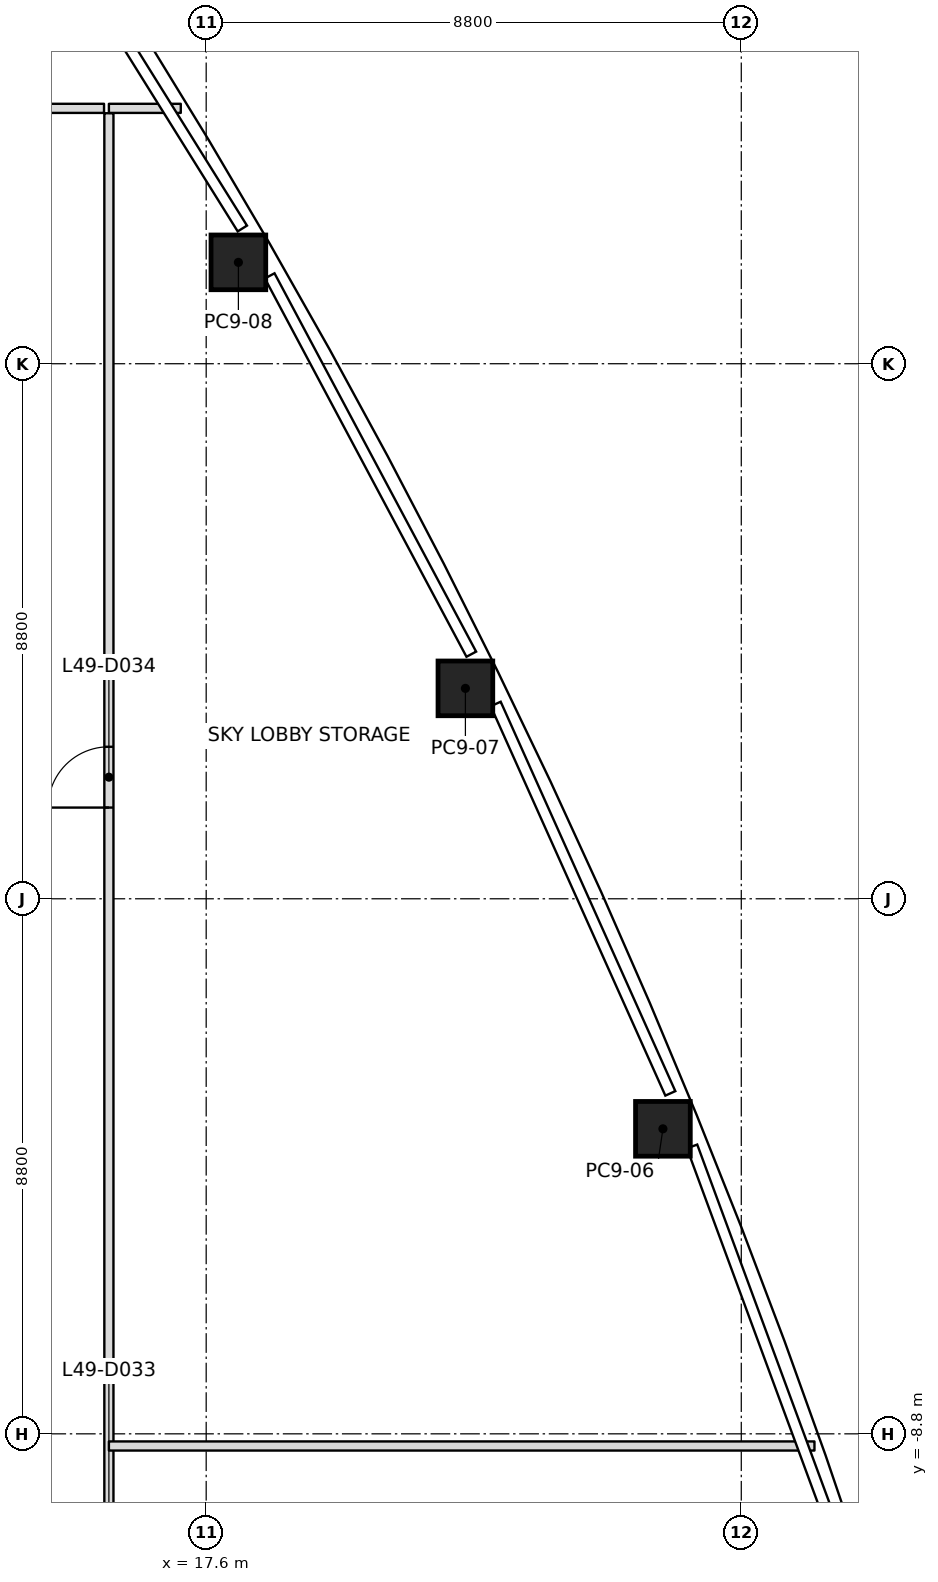
"""IFC4 building model, lengths in metres.
Left out: names, types, materials, properties, quantities, classifications, styles, units other than length and angle.
Written with IfcOpenShell. Run it as: python <this file> out.ifc"""

import sys

from ifc_helpers import new_model, si_unit, direction, frame, frame_2d, origin, origin_2d, place, context, subcontext, project, spatial, rectangle, extrude, clip, halfspace, element, fill, save


model = new_model("IFC4")
c1 = context("Model", 3, precision=1e-05, world=origin(), true_north=direction((0.0, 1.0)))
c2 = subcontext(c1, "Body", "Model", "MODEL_VIEW")
j1 = project(units=[si_unit("LENGTHUNIT", "METRE"), si_unit("PLANEANGLEUNIT", "RADIAN")], contexts=[c1])
p1 = place(None, origin())
s1 = spatial("IfcSite", under=j1, at=p1, CompositionType="ELEMENT")
p2 = place(p1, origin())
s2 = spatial("IfcBuilding", under=s1, at=p2, CompositionType="ELEMENT")
p3 = place(p2, frame((0.0, 0.0, 219.8)))
s3 = spatial("IfcBuildingStorey", under=s2, at=p3, CompositionType="ELEMENT", Elevation=219.8)
p4 = place(p3, frame((25.111, -3.784, 0.0), z_axis=(-0.009900687447, 0.005560660073, 0.999935525645), x_axis=(-0.377861048249, 0.925819636439, -0.00888982559)))
e1 = element("IfcColumn", 1, at=p4, inside=s3, PredefinedType="COLUMN", context=c2, shape_type="SweptSolid", body=[
    clip(clip(extrude(rectangle(XDim=0.9, YDim=0.9, at=origin_2d()), origin(), (0.0, 0.0, 1.0), 7.2), halfspace(frame((0.0, 0.0, 0.001)), True)), halfspace(frame((0.0, 0.0, 7.197)), False)),
])
p5 = place(p3, frame((21.863, 3.461, 0.0), z_axis=(-0.007832652989, 0.001118950427, 0.999968698259), x_axis=(-0.439944481987, 0.898013943218, -0.004450904868)))
e2 = element("IfcColumn", 2, at=p5, inside=s3, PredefinedType="COLUMN", context=c2, shape_type="SweptSolid", body=[
    clip(clip(extrude(rectangle(XDim=0.9, YDim=0.9, at=origin_2d()), origin(), (0.0, 0.0, 1.0), 7.2), halfspace(frame((0.0, 0.0, 0.001)), True)), halfspace(frame((0.0, 0.0, 7.198)), False)),
])
p6 = place(p3, frame((18.13, 10.467, 0.0), z_axis=(-0.005493091126, -0.003153441202, 0.999979940678), x_axis=(-0.499992456431, 0.866029758883, -1.5530513e-05)))
e3 = element("IfcColumn", 3, at=p6, inside=s3, PredefinedType="COLUMN", context=c2, shape_type="SweptSolid", body=[
    clip(clip(extrude(rectangle(XDim=0.9, YDim=0.9, at=origin_2d()), origin(), (0.0, 0.0, 1.0), 7.2), halfspace(frame((0.0, 0.0, 0.0)), True)), halfspace(frame((0.0, 0.0, 7.199)), False)),
])
p7 = place(p3, frame((16.0, -9.0, 0.0), z_axis=(0.0, 0.0, 1.0), x_axis=(1.0, 0.0, 0.0)))
e4 = element("IfcWall", 4, at=p7, inside=s3, PredefinedType="PARTITIONING", context=c2, shape_type="SweptSolid", body=[
    extrude(rectangle(XDim=11.604, YDim=0.15, at=frame_2d((5.802, 0.0))), origin(), (0.0, 0.0, 1.0), 6.434),
])
p8 = place(p3, frame((17.182, 13.0, 0.0), z_axis=(0.0, 0.0, 1.0), x_axis=(-1.0, 0.0, 0.0)))
e5 = element("IfcWall", 5, at=p8, inside=s3, PredefinedType="PARTITIONING", context=c2, shape_type="SweptSolid", body=[
    extrude(rectangle(XDim=1.182, YDim=0.15, at=frame_2d((0.591, 0.0))), origin(), (0.0, 0.0, 1.0), 6.434),
])
p9 = place(p3, frame((15.92, 13.0, 0.0), z_axis=(0.0, 0.0, 1.0), x_axis=(-1.0, 0.0, 0.0)))
e6 = element("IfcWall", 6, at=p9, inside=s3, PredefinedType="PARTITIONING", context=c2, shape_type="SweptSolid", body=[
    extrude(rectangle(XDim=31.84, YDim=0.15, at=frame_2d((15.92, 0.0))), origin(), (0.0, 0.0, 1.0), 6.433),
])
p10 = place(p9, frame((5.91, 0.0, 0.0)))
e7 = element("IfcOpeningElement", 7, at=p10, cuts=e6, PredefinedType="OPENING", context=c2, shape_type="SweptSolid", body=[
    extrude(rectangle(XDim=1.0, YDim=2.1, at=frame_2d((0.5, 1.05))), frame((0.0, 0.075, 0.0), z_axis=(0.0, -1.0, 0.0), x_axis=(1.0, 0.0, 0.0)), (0.0, 0.0, 1.0), 0.15),
])
p11 = place(p9, frame((21.73, 0.0, 0.0)))
e8 = element("IfcOpeningElement", 8, at=p11, cuts=e6, PredefinedType="OPENING", context=c2, shape_type="SweptSolid", body=[
    extrude(rectangle(XDim=1.4, YDim=2.1, at=frame_2d((0.7, 1.05))), frame((0.0, 0.075, 0.0), z_axis=(0.0, -1.0, 0.0), x_axis=(1.0, 0.0, 0.0)), (0.0, 0.0, 1.0), 0.15),
])
p12 = place(p3, frame((16.0, -12.92, 0.0), z_axis=(0.0, 0.0, 1.0), x_axis=(0.0, 1.0, 0.0)))
e9 = element("IfcWall", 9, at=p12, inside=s3, PredefinedType="PARTITIONING", context=c2, shape_type="SweptSolid", body=[
    extrude(rectangle(XDim=25.84, YDim=0.15, at=frame_2d((12.92, 0.0))), origin(), (0.0, 0.0, 1.0), 6.433),
])
p13 = place(p12, frame((1.01, 0.0, 0.0)))
e10 = element("IfcOpeningElement", 10, at=p13, cuts=e9, PredefinedType="OPENING", context=c2, shape_type="SweptSolid", body=[
    extrude(rectangle(XDim=1.8, YDim=2.1, at=frame_2d((0.9, 1.05))), frame((0.0, 0.075, 0.0), z_axis=(0.0, -1.0, 0.0), x_axis=(1.0, 0.0, 0.0)), (0.0, 0.0, 1.0), 0.15),
])
p14 = place(p12, frame((14.42, 0.0, 0.0)))
e11 = element("IfcOpeningElement", 11, at=p14, cuts=e9, PredefinedType="OPENING", context=c2, shape_type="SweptSolid", body=[
    extrude(rectangle(XDim=1.0, YDim=2.1, at=frame_2d((0.5, 1.05))), frame((0.0, 0.075, 0.0), z_axis=(0.0, -1.0, 0.0), x_axis=(1.0, 0.0, 0.0)), (0.0, 0.0, 1.0), 0.15),
])
p15 = place(p14, origin())
e12 = element("IfcDoor", 12, at=p15, inside=s3, OperationType="SINGLE_SWING_RIGHT", PredefinedType="DOOR", context=c2, shape_type="SweptSolid", body=[
    extrude(rectangle(XDim=1.0, YDim=2.1, at=frame_2d((0.5, 1.05))), frame((0.0, 0.025, 0.0), z_axis=(0.0, -1.0, 0.0), x_axis=(1.0, 0.0, 0.0)), (0.0, 0.0, 1.0), 0.05),
])
fill(e11, e12)
save(model, sys.argv[1])
